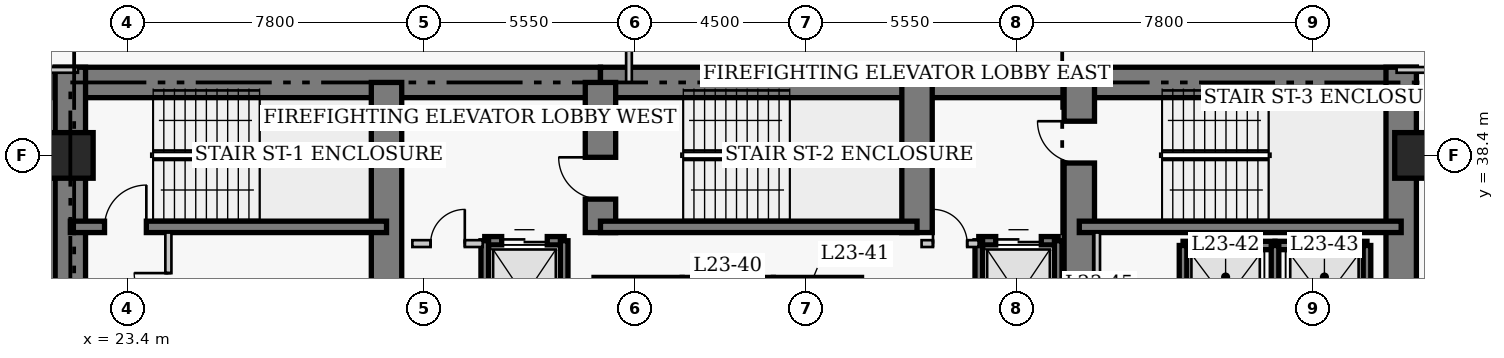
"""IFC4 building model, lengths in metres.
Left out: names, types, materials, properties, quantities, classifications, styles, units other than length and angle.
Written with IfcOpenShell. Run it as: python <this file> out.ifc"""

import sys

from ifc_helpers import new_model, si_unit, direction, frame, frame_2d, origin, origin_2d, place, context, subcontext, project, spatial, rectangle, extrude, element, fill, save


model = new_model("IFC4")
c1 = context("Model", 3, precision=1e-05, world=origin(), true_north=direction((0.0, 1.0)))
c2 = subcontext(c1, "Body", "Model", "MODEL_VIEW")
j1 = project(units=[si_unit("LENGTHUNIT", "METRE"), si_unit("PLANEANGLEUNIT", "RADIAN")], contexts=[c1])
p1 = place(None, origin())
s1 = spatial("IfcSite", under=j1, at=p1, CompositionType="ELEMENT")
p2 = place(p1, origin())
s2 = spatial("IfcBuilding", under=s1, at=p2, CompositionType="ELEMENT")
p3 = place(p2, frame((0.0, 0.0, 95.6)))
s3 = spatial("IfcBuildingStorey", under=s2, at=p3, CompositionType="ELEMENT", Elevation=95.6)
p4 = place(p3, frame((21.5, 40.32, 0.0), z_axis=(0.0, 0.0, 1.0), x_axis=(1.0, 0.0, 0.0)))
e1 = element("IfcWall", 1, at=p4, inside=s3, PredefinedType="SHEAR", context=c2, shape_type="SweptSolid", body=[
    extrude(rectangle(XDim=14.35, YDim=0.8, at=frame_2d((7.175, 0.0))), origin(), (0.0, 0.0, 1.0), 3.8),
])
p5 = place(p3, frame((35.85, 40.32, 0.0), z_axis=(0.0, 0.0, 1.0), x_axis=(1.0, 0.0, 0.0)))
e2 = element("IfcWall", 2, at=p5, inside=s3, PredefinedType="SHEAR", context=c2, shape_type="SweptSolid", body=[
    extrude(rectangle(XDim=12.6, YDim=0.8, at=frame_2d((6.3, 0.0))), origin(), (0.0, 0.0, 1.0), 3.8),
])
p6 = place(p3, frame((48.45, 40.32, 0.0), z_axis=(0.0, 0.0, 1.0), x_axis=(1.0, 0.0, 0.0)))
e3 = element("IfcWall", 3, at=p6, inside=s3, PredefinedType="SHEAR", context=c2, shape_type="SweptSolid", body=[
    extrude(rectangle(XDim=8.87, YDim=0.8, at=frame_2d((4.435, 0.0))), origin(), (0.0, 0.0, 1.0), 3.8),
])
for number, where, z_axis, x_axis in (
    (4, (21.9, 27.05, 0.0), (0.0, 0.0, 1.0), (0.0, 1.0, 0.0)),
    (5, (56.92, 27.05, 0.0), (0.0, 0.0, 1.0), (0.0, 1.0, 0.0)),
):
    element("IfcWall", number, at=place(p3, frame(where, z_axis=z_axis, x_axis=x_axis)), inside=s3, PredefinedType="SHEAR", context=c2, shape_type="SweptSolid", body=[
        extrude(rectangle(XDim=13.67, YDim=0.8, at=frame_2d((6.835, 0.0))), origin(), (0.0, 0.0, 1.0), 3.8),
    ])
p7 = place(p3, frame((30.22, 33.15, 0.0), z_axis=(0.0, 0.0, 1.0), x_axis=(0.0, 1.0, 0.0)))
e6 = element("IfcWall", 6, at=p7, inside=s3, PredefinedType="SHEAR", context=c2, shape_type="SweptSolid", body=[
    extrude(rectangle(XDim=7.17, YDim=0.8, at=frame_2d((3.585, 0.0))), origin(), (0.0, 0.0, 1.0), 3.8),
])
p8 = place(p3, frame((35.85, 36.37, 0.0), z_axis=(0.0, 0.0, 1.0), x_axis=(0.0, 1.0, 0.0)))
e7 = element("IfcWall", 7, at=p8, inside=s3, PredefinedType="SHEAR", context=c2, shape_type="SweptSolid", body=[
    extrude(rectangle(XDim=3.95, YDim=0.8, at=frame_2d((1.975, 0.0))), origin(), (0.0, 0.0, 1.0), 3.8),
])
p9 = place(p8, frame((0.88, 0.0, 0.0)))
e8 = element("IfcOpeningElement", 8, at=p9, cuts=e7, PredefinedType="OPENING", context=c2, shape_type="SweptSolid", body=[
    extrude(rectangle(XDim=1.1, YDim=2.15, at=frame_2d((0.55, 1.075))), frame((0.0, 0.41, 0.0), z_axis=(0.0, -1.0, 0.0), x_axis=(1.0, 0.0, 0.0)), (0.0, 0.0, 1.0), 0.82),
])
p10 = place(p3, frame((44.18, 36.37, 0.0), z_axis=(0.0, 0.0, 1.0), x_axis=(0.0, 1.0, 0.0)))
e9 = element("IfcWall", 9, at=p10, inside=s3, PredefinedType="SHEAR", context=c2, shape_type="SweptSolid", body=[
    extrude(rectangle(XDim=3.95, YDim=0.8, at=frame_2d((1.975, 0.0))), origin(), (0.0, 0.0, 1.0), 3.8),
])
p11 = place(p3, frame((48.45, 32.35, 0.0), z_axis=(0.0, 0.0, 1.0), x_axis=(0.0, 1.0, 0.0)))
e10 = element("IfcWall", 10, at=p11, inside=s3, PredefinedType="SHEAR", context=c2, shape_type="SweptSolid", body=[
    extrude(rectangle(XDim=7.97, YDim=0.8, at=frame_2d((3.985, 0.0))), origin(), (0.0, 0.0, 1.0), 3.8),
])
p12 = place(p11, frame((5.85, 0.0, 0.0)))
e11 = element("IfcOpeningElement", 11, at=p12, cuts=e10, PredefinedType="OPENING", context=c2, shape_type="SweptSolid", body=[
    extrude(rectangle(XDim=1.1, YDim=2.15, at=frame_2d((0.55, 1.075))), frame((0.0, 0.41, 0.0), z_axis=(0.0, -1.0, 0.0), x_axis=(1.0, 0.0, 0.0)), (0.0, 0.0, 1.0), 0.82),
])
p13 = place(p3, frame((21.9, 36.52, 0.0), z_axis=(0.0, 0.0, 1.0), x_axis=(1.0, 0.0, 0.0)))
e12 = element("IfcWall", 12, at=p13, inside=s3, PredefinedType="SHEAR", context=c2, shape_type="SweptSolid", body=[
    extrude(rectangle(XDim=8.32, YDim=0.3, at=frame_2d((4.16, 0.0))), origin(), (0.0, 0.0, 1.0), 3.8),
])
p14 = place(p13, frame((0.9, 0.0, 0.0)))
e13 = element("IfcOpeningElement", 13, at=p14, cuts=e12, PredefinedType="OPENING", context=c2, shape_type="SweptSolid", body=[
    extrude(rectangle(XDim=1.1, YDim=2.15, at=frame_2d((0.55, 1.075))), frame((0.0, 0.16, 0.0), z_axis=(0.0, -1.0, 0.0), x_axis=(1.0, 0.0, 0.0)), (0.0, 0.0, 1.0), 0.32),
])
p15 = place(p3, frame((35.85, 36.52, 0.0), z_axis=(0.0, 0.0, 1.0), x_axis=(1.0, 0.0, 0.0)))
e14 = element("IfcWall", 14, at=p15, inside=s3, PredefinedType="SHEAR", context=c2, shape_type="SweptSolid", body=[
    extrude(rectangle(XDim=8.33, YDim=0.3, at=frame_2d((4.165, 0.0))), origin(), (0.0, 0.0, 1.0), 3.8),
])
p16 = place(p3, frame((48.45, 36.52, 0.0), z_axis=(0.0, 0.0, 1.0), x_axis=(1.0, 0.0, 0.0)))
e15 = element("IfcWall", 15, at=p16, inside=s3, PredefinedType="SHEAR", context=c2, shape_type="SweptSolid", body=[
    extrude(rectangle(XDim=8.47, YDim=0.3, at=frame_2d((4.235, 0.0))), origin(), (0.0, 0.0, 1.0), 3.8),
])
for number, where, z_axis, x_axis in (
    (16, (21.9, 38.4, 0.0), (0.0, 0.0, 1.0), (1.0, 0.0, 0.0)),
    (17, (57.35, 38.4, 0.0), (0.0, 0.0, 1.0), (1.0, 0.0, 0.0)),
):
    element("IfcColumn", number, at=place(p3, frame(where, z_axis=z_axis, x_axis=x_axis)), inside=s3, PredefinedType="COLUMN", context=c2, shape_type="SweptSolid", body=[
        extrude(rectangle(XDim=1.2, YDim=1.2, at=origin_2d()), origin(), (0.0, 0.0, 1.0), 3.8),
    ])
p17 = place(p3, frame((35.68, 35.08, 0.0), z_axis=(0.0, 0.0, 1.0), x_axis=(1.0, 0.0, 0.0)))
e18 = element("IfcWall", 18, at=p17, inside=s3, PredefinedType="SHEAR", context=c2, shape_type="SweptSolid", body=[
    extrude(rectangle(XDim=2.32, YDim=0.22, at=frame_2d((1.16, 0.0))), origin(), (0.0, 0.0, 1.0), 3.8),
])
p18 = place(p3, frame((38.0, 35.08, 0.0), z_axis=(0.0, 0.0, 1.0), x_axis=(1.0, 0.0, 0.0)))
e19 = element("IfcWall", 19, at=p18, inside=s3, PredefinedType="SHEAR", context=c2, shape_type="SweptSolid", body=[
    extrude(rectangle(XDim=2.4, YDim=0.22, at=frame_2d((1.2, 0.0))), origin(), (0.0, 0.0, 1.0), 3.8),
])
p19 = place(p3, frame((40.4, 35.08, 0.0), z_axis=(0.0, 0.0, 1.0), x_axis=(1.0, 0.0, 0.0)))
e20 = element("IfcWall", 20, at=p19, inside=s3, PredefinedType="SHEAR", context=c2, shape_type="SweptSolid", body=[
    extrude(rectangle(XDim=2.32, YDim=0.22, at=frame_2d((1.16, 0.0))), origin(), (0.0, 0.0, 1.0), 3.8),
])
p20 = place(p3, frame((51.18, 36.03, 0.0), z_axis=(0.0, 0.0, 1.0), x_axis=(1.0, 0.0, 0.0)))
e21 = element("IfcWall", 21, at=p20, inside=s3, PredefinedType="SHEAR", context=c2, shape_type="SweptSolid", body=[
    extrude(rectangle(XDim=2.42, YDim=0.22, at=frame_2d((1.21, 0.0))), origin(), (0.0, 0.0, 1.0), 3.8),
])
p21 = place(p3, frame((51.18, 33.17, 0.0), z_axis=(0.0, 0.0, 1.0), x_axis=(0.0, 1.0, 0.0)))
e22 = element("IfcWall", 22, at=p21, inside=s3, PredefinedType="SHEAR", context=c2, shape_type="SweptSolid", body=[
    extrude(rectangle(XDim=2.86, YDim=0.2, at=frame_2d((1.43, 0.0))), origin(), (0.0, 0.0, 1.0), 3.8),
])
p22 = place(p3, frame((53.6, 36.03, 0.0), z_axis=(0.0, 0.0, 1.0), x_axis=(1.0, 0.0, 0.0)))
e23 = element("IfcWall", 23, at=p22, inside=s3, PredefinedType="SHEAR", context=c2, shape_type="SweptSolid", body=[
    extrude(rectangle(XDim=2.42, YDim=0.22, at=frame_2d((1.21, 0.0))), origin(), (0.0, 0.0, 1.0), 3.8),
])
for number, where, z_axis, x_axis in (
    (24, (53.6, 33.17, 0.0), (0.0, 0.0, 1.0), (0.0, 1.0, 0.0)),
    (25, (56.02, 33.17, 0.0), (0.0, 0.0, 1.0), (0.0, 1.0, 0.0)),
):
    element("IfcWall", number, at=place(p3, frame(where, z_axis=z_axis, x_axis=x_axis)), inside=s3, PredefinedType="SHEAR", context=c2, shape_type="SweptSolid", body=[
        extrude(rectangle(XDim=2.86, YDim=0.2, at=frame_2d((1.43, 0.0))), origin(), (0.0, 0.0, 1.0), 3.8),
    ])
p23 = place(p3, frame((32.805, 36.155, 0.0), z_axis=(0.0, 0.0, 1.0), x_axis=(1.0, 0.0, 0.0)))
e26 = element("IfcWall", 26, at=p23, inside=s3, PredefinedType="SHEAR", context=c2, shape_type="SweptSolid", body=[
    extrude(rectangle(XDim=2.09, YDim=0.22, at=frame_2d((1.045, 0.0))), origin(), (0.0, 0.0, 1.0), 3.8),
])
p24 = place(p23, frame((0.445, 0.0, 0.0)))
e27 = element("IfcOpeningElement", 27, at=p24, cuts=e26, PredefinedType="OPENING", context=c2, shape_type="SweptSolid", body=[
    extrude(rectangle(XDim=1.2, YDim=2.15, at=frame_2d((0.6, 1.075))), frame((0.0, 0.12, 0.0), z_axis=(0.0, -1.0, 0.0), x_axis=(1.0, 0.0, 0.0)), (0.0, 0.0, 1.0), 0.24),
])
for number, where, z_axis, x_axis in (
    (28, (32.805, 33.245, 0.0), (0.0, 0.0, 1.0), (0.0, 1.0, 0.0)),
    (29, (34.895, 33.245, 0.0), (0.0, 0.0, 1.0), (0.0, 1.0, 0.0)),
):
    element("IfcWall", number, at=place(p3, frame(where, z_axis=z_axis, x_axis=x_axis)), inside=s3, PredefinedType="SHEAR", context=c2, shape_type="SweptSolid", body=[
        extrude(rectangle(XDim=2.91, YDim=0.2, at=frame_2d((1.455, 0.0))), origin(), (0.0, 0.0, 1.0), 3.8),
    ])
p25 = place(p3, frame((45.805, 36.155, 0.0), z_axis=(0.0, 0.0, 1.0), x_axis=(1.0, 0.0, 0.0)))
e30 = element("IfcWall", 30, at=p25, inside=s3, PredefinedType="SHEAR", context=c2, shape_type="SweptSolid", body=[
    extrude(rectangle(XDim=2.09, YDim=0.22, at=frame_2d((1.045, 0.0))), origin(), (0.0, 0.0, 1.0), 3.8),
])
p26 = place(p25, frame((0.445, 0.0, 0.0)))
e31 = element("IfcOpeningElement", 31, at=p26, cuts=e30, PredefinedType="OPENING", context=c2, shape_type="SweptSolid", body=[
    extrude(rectangle(XDim=1.2, YDim=2.15, at=frame_2d((0.6, 1.075))), frame((0.0, 0.12, 0.0), z_axis=(0.0, -1.0, 0.0), x_axis=(1.0, 0.0, 0.0)), (0.0, 0.0, 1.0), 0.24),
])
p27 = place(p3, frame((45.805, 32.65, 0.0), z_axis=(0.0, 0.0, 1.0), x_axis=(0.0, 1.0, 0.0)))
e32 = element("IfcWall", 32, at=p27, inside=s3, PredefinedType="SHEAR", context=c2, shape_type="SweptSolid", body=[
    extrude(rectangle(XDim=3.505, YDim=0.2, at=frame_2d((1.752, 0.0))), origin(), (0.0, 0.0, 1.0), 3.8),
])
p28 = place(p3, frame((47.895, 33.245, 0.0), z_axis=(0.0, 0.0, 1.0), x_axis=(0.0, 1.0, 0.0)))
e33 = element("IfcWall", 33, at=p28, inside=s3, PredefinedType="SHEAR", context=c2, shape_type="SweptSolid", body=[
    extrude(rectangle(XDim=2.91, YDim=0.2, at=frame_2d((1.455, 0.0))), origin(), (0.0, 0.0, 1.0), 3.8),
])
p29 = place(p3, frame((30.9, 36.08, 0.0), z_axis=(0.0, 0.0, 1.0), x_axis=(1.0, 0.0, 0.0)))
e34 = element("IfcWall", 34, at=p29, inside=s3, PredefinedType="PARTITIONING", context=c2, shape_type="SweptSolid", body=[
    extrude(rectangle(XDim=1.85, YDim=0.18, at=frame_2d((0.925, 0.0))), origin(), (0.0, 0.0, 1.0), 3.54),
])
p30 = place(p29, frame((0.48, 0.0, 0.0)))
e35 = element("IfcOpeningElement", 35, at=p30, cuts=e34, PredefinedType="OPENING", context=c2, shape_type="SweptSolid", body=[
    extrude(rectangle(XDim=0.9, YDim=2.15, at=frame_2d((0.45, 1.075))), frame((0.0, 0.1, 0.0), z_axis=(0.0, -1.0, 0.0), x_axis=(1.0, 0.0, 0.0)), (0.0, 0.0, 1.0), 0.2),
])
p31 = place(p3, frame((44.3, 36.08, 0.0), z_axis=(0.0, 0.0, 1.0), x_axis=(1.0, 0.0, 0.0)))
e36 = element("IfcWall", 36, at=p31, inside=s3, PredefinedType="PARTITIONING", context=c2, shape_type="SweptSolid", body=[
    extrude(rectangle(XDim=1.5, YDim=0.18, at=frame_2d((0.75, 0.0))), origin(), (0.0, 0.0, 1.0), 3.54),
])
p32 = place(p31, frame((0.3, 0.0, 0.0)))
e37 = element("IfcOpeningElement", 37, at=p32, cuts=e36, PredefinedType="OPENING", context=c2, shape_type="SweptSolid", body=[
    extrude(rectangle(XDim=0.9, YDim=2.15, at=frame_2d((0.45, 1.075))), frame((0.0, 0.1, 0.0), z_axis=(0.0, -1.0, 0.0), x_axis=(1.0, 0.0, 0.0)), (0.0, 0.0, 1.0), 0.2),
])
p33 = place(p3, frame((24.48, 32.8, 0.0), z_axis=(0.0, 0.0, 1.0), x_axis=(0.0, 1.0, 0.0)))
e38 = element("IfcWall", 38, at=p33, inside=s3, PredefinedType="PARTITIONING", context=c2, shape_type="SweptSolid", body=[
    extrude(rectangle(XDim=3.57, YDim=0.16, at=frame_2d((1.785, 0.0))), origin(), (0.0, 0.0, 1.0), 3.54),
])
p34 = place(p33, frame((1.604, 0.0, 0.0)))
e39 = element("IfcOpeningElement", 39, at=p34, cuts=e38, PredefinedType="OPENING", context=c2, shape_type="SweptSolid", body=[
    extrude(rectangle(XDim=0.9, YDim=2.1, at=frame_2d((0.45, 1.05))), frame((0.0, 0.09, 0.0), z_axis=(0.0, -1.0, 0.0), x_axis=(1.0, 0.0, 0.0)), (0.0, 0.0, 1.0), 0.18),
])
p35 = place(p3, frame((48.92, 32.75, 0.0), z_axis=(0.0, 0.0, 1.0), x_axis=(0.0, 1.0, 0.0)))
e40 = element("IfcWall", 40, at=p35, inside=s3, PredefinedType="PARTITIONING", context=c2, shape_type="SweptSolid", body=[
    extrude(rectangle(XDim=3.62, YDim=0.15, at=frame_2d((1.81, 0.0))), origin(), (0.0, 0.0, 1.0), 3.54),
])
p36 = place(p3, frame((16.64, 40.65, 0.0), z_axis=(0.0, 0.0, 1.0), x_axis=(1.0, 0.0, 0.0)))
e41 = element("IfcWall", 41, at=p36, inside=s3, PredefinedType="PARTITIONING", context=c2, shape_type="SweptSolid", body=[
    extrude(rectangle(XDim=5.46, YDim=0.15, at=frame_2d((2.73, 0.0))), origin(), (0.0, 0.0, 1.0), 3.54),
])
p37 = place(p36, frame((0.55, 0.0, 0.0)))
e42 = element("IfcOpeningElement", 42, at=p37, cuts=e41, PredefinedType="OPENING", context=c2, shape_type="SweptSolid", body=[
    extrude(rectangle(XDim=1.0, YDim=2.15, at=frame_2d((0.5, 1.075))), frame((0.0, 0.085, 0.0), z_axis=(0.0, -1.0, 0.0), x_axis=(1.0, 0.0, 0.0)), (0.0, 0.0, 1.0), 0.17),
])
p38 = place(p3, frame((56.8, 40.65, 0.0), z_axis=(0.0, 0.0, 1.0), x_axis=(1.0, 0.0, 0.0)))
e43 = element("IfcWall", 43, at=p38, inside=s3, PredefinedType="PARTITIONING", context=c2, shape_type="SweptSolid", body=[
    extrude(rectangle(XDim=4.21, YDim=0.15, at=frame_2d((2.105, 0.0))), origin(), (0.0, 0.0, 1.0), 3.54),
])
p39 = place(p38, frame((2.6, 0.0, 0.0)))
e44 = element("IfcOpeningElement", 44, at=p39, cuts=e43, PredefinedType="OPENING", context=c2, shape_type="SweptSolid", body=[
    extrude(rectangle(XDim=1.0, YDim=2.15, at=frame_2d((0.5, 1.075))), frame((0.0, 0.085, 0.0), z_axis=(0.0, -1.0, 0.0), x_axis=(1.0, 0.0, 0.0)), (0.0, 0.0, 1.0), 0.17),
])
p40 = place(p3, frame((36.6, 40.32, 0.0), z_axis=(0.0, 0.0, 1.0), x_axis=(0.0, 1.0, 0.0)))
e45 = element("IfcWall", 45, at=p40, inside=s3, PredefinedType="PARTITIONING", context=c2, shape_type="SweptSolid", body=[
    extrude(rectangle(XDim=3.445, YDim=0.15, at=frame_2d((1.723, 0.0))), origin(), (0.0, 0.0, 1.0), 3.54),
])
p41 = place(p24, origin())
e46 = element("IfcDoor", 46, at=p41, inside=s3, OperationType="DOUBLE_DOOR_SLIDING", PredefinedType="DOOR", context=c2, shape_type="SweptSolid", body=[
    extrude(rectangle(XDim=1.2, YDim=2.15, at=frame_2d((0.6, 1.075))), frame((0.0, 0.025, 0.0), z_axis=(0.0, -1.0, 0.0), x_axis=(1.0, 0.0, 0.0)), (0.0, 0.0, 1.0), 0.05),
])
fill(e27, e46)
p42 = place(p26, origin())
e47 = element("IfcDoor", 47, at=p42, inside=s3, OperationType="DOUBLE_DOOR_SLIDING", PredefinedType="DOOR", context=c2, shape_type="SweptSolid", body=[
    extrude(rectangle(XDim=1.2, YDim=2.15, at=frame_2d((0.6, 1.075))), frame((0.0, 0.025, 0.0), z_axis=(0.0, -1.0, 0.0), x_axis=(1.0, 0.0, 0.0)), (0.0, 0.0, 1.0), 0.05),
])
fill(e31, e47)
p43 = place(p30, origin())
e48 = element("IfcDoor", 48, at=p43, inside=s3, OperationType="SINGLE_SWING_RIGHT", PredefinedType="DOOR", context=c2, shape_type="SweptSolid", body=[
    extrude(rectangle(XDim=0.9, YDim=2.15, at=frame_2d((0.45, 1.075))), frame((0.0, 0.025, 0.0), z_axis=(0.0, -1.0, 0.0), x_axis=(1.0, 0.0, 0.0)), (0.0, 0.0, 1.0), 0.05),
])
fill(e35, e48)
p44 = place(p32, origin())
e49 = element("IfcDoor", 49, at=p44, inside=s3, OperationType="SINGLE_SWING_LEFT", PredefinedType="DOOR", context=c2, shape_type="SweptSolid", body=[
    extrude(rectangle(XDim=0.9, YDim=2.15, at=frame_2d((0.45, 1.075))), frame((0.0, 0.025, 0.0), z_axis=(0.0, -1.0, 0.0), x_axis=(1.0, 0.0, 0.0)), (0.0, 0.0, 1.0), 0.05),
])
fill(e37, e49)
p45 = place(p34, origin())
e50 = element("IfcDoor", 50, at=p45, inside=s3, OperationType="SINGLE_SWING_RIGHT", PredefinedType="DOOR", context=c2, shape_type="SweptSolid", body=[
    extrude(rectangle(XDim=0.9, YDim=2.1, at=frame_2d((0.45, 1.05))), frame((0.0, 0.025, 0.0), z_axis=(0.0, -1.0, 0.0), x_axis=(1.0, 0.0, 0.0)), (0.0, 0.0, 1.0), 0.05),
])
fill(e39, e50)
p46 = place(p14, origin())
e51 = element("IfcDoor", 51, at=p46, inside=s3, OperationType="SINGLE_SWING_RIGHT", PredefinedType="DOOR", context=c2, shape_type="SweptSolid", body=[
    extrude(rectangle(XDim=1.1, YDim=2.15, at=frame_2d((0.55, 1.075))), frame((0.0, 0.025, 0.0), z_axis=(0.0, -1.0, 0.0), x_axis=(1.0, 0.0, 0.0)), (0.0, 0.0, 1.0), 0.05),
])
fill(e13, e51)
p47 = place(p9, origin())
e52 = element("IfcDoor", 52, at=p47, inside=s3, OperationType="SINGLE_SWING_RIGHT", PredefinedType="DOOR", context=c2, shape_type="SweptSolid", body=[
    extrude(rectangle(XDim=1.1, YDim=2.15, at=frame_2d((0.55, 1.075))), frame((0.0, 0.025, 0.0), z_axis=(0.0, -1.0, 0.0), x_axis=(1.0, 0.0, 0.0)), (0.0, 0.0, 1.0), 0.05),
])
fill(e8, e52)
p48 = place(p12, origin())
e53 = element("IfcDoor", 53, at=p48, inside=s3, OperationType="SINGLE_SWING_RIGHT", PredefinedType="DOOR", context=c2, shape_type="SweptSolid", body=[
    extrude(rectangle(XDim=1.1, YDim=2.15, at=frame_2d((0.55, 1.075))), frame((0.0, 0.025, 0.0), z_axis=(0.0, -1.0, 0.0), x_axis=(1.0, 0.0, 0.0)), (0.0, 0.0, 1.0), 0.05),
])
fill(e11, e53)
save(model, sys.argv[1])
